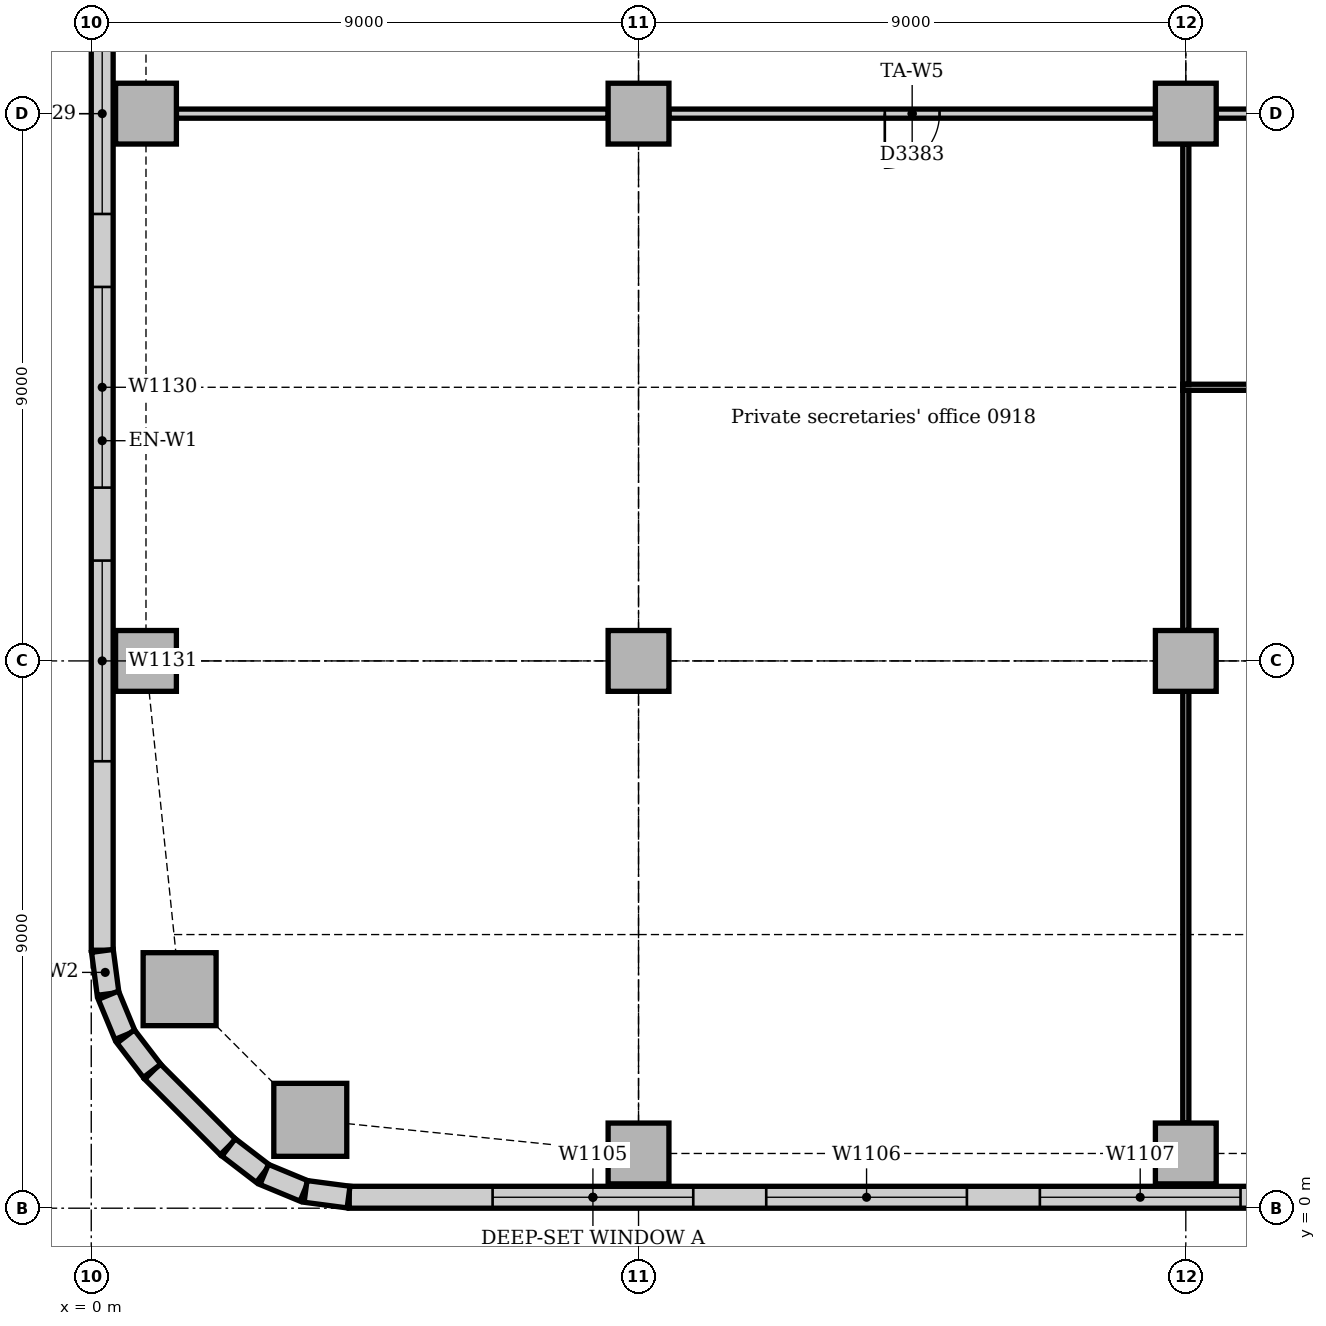
"""IFC4 building model, lengths in metres.
Left out: names, types, materials, properties, quantities, classifications, styles, units other than length and angle.
Written with IfcOpenShell. Run it as: python <this file> out.ifc"""

import sys

from ifc_helpers import new_model, si_unit, direction, frame, frame_2d, origin, origin_2d, place, context, subcontext, project, spatial, rectangle, extrude, element, fill, save


model = new_model("IFC4")
c1 = context("Model", 3, precision=1e-05, world=origin(), true_north=direction((0.0, 1.0)))
c2 = subcontext(c1, "Body", "Model", "MODEL_VIEW")
j1 = project(units=[si_unit("LENGTHUNIT", "METRE"), si_unit("PLANEANGLEUNIT", "RADIAN")], contexts=[c1])
p1 = place(None, origin())
s1 = spatial("IfcSite", under=j1, at=p1, CompositionType="ELEMENT")
p2 = place(p1, origin())
s2 = spatial("IfcBuilding", under=s1, at=p2, CompositionType="ELEMENT")
p3 = place(p2, frame((0.0, 0.0, 42.0)))
s3 = spatial("IfcBuildingStorey", under=s2, at=p3, CompositionType="ELEMENT", Elevation=42.0)
for number, where, z_axis, x_axis in (
    (1, (3.602, 1.453, 0.0), (0.0, 0.0, 1.0), (1.0, 0.0, 0.0)),
    (2, (1.453, 3.602, 0.0), (0.0, 0.0, 1.0), (1.0, 0.0, 0.0)),
):
    element("IfcColumn", number, at=place(p3, frame(where, z_axis=z_axis, x_axis=x_axis)), inside=s3, PredefinedType="COLUMN", context=c2, shape_type="SweptSolid", body=[
        extrude(rectangle(XDim=1.2, YDim=1.2, at=origin_2d()), origin(), (0.0, 0.0, 1.0), 3.7),
    ])
for number, where, z_axis, x_axis in (
    (3, (9.0, 0.9, 0.0), (0.0, 0.0, 1.0), (1.0, 0.0, 0.0)),
    (4, (18.0, 0.9, 0.0), (0.0, 0.0, 1.0), (1.0, 0.0, 0.0)),
    (5, (0.9, 9.0, 0.0), (0.0, 0.0, 1.0), (1.0, 0.0, 0.0)),
    (6, (0.9, 18.0, 0.0), (0.0, 0.0, 1.0), (1.0, 0.0, 0.0)),
    (7, (9.0, 9.0, 0.0), (0.0, 0.0, 1.0), (1.0, 0.0, 0.0)),
    (8, (9.0, 18.0, 0.0), (0.0, 0.0, 1.0), (1.0, 0.0, 0.0)),
    (9, (18.0, 9.0, 0.0), (0.0, 0.0, 1.0), (1.0, 0.0, 0.0)),
    (10, (18.0, 18.0, 0.0), (0.0, 0.0, 1.0), (1.0, 0.0, 0.0)),
):
    element("IfcColumn", number, at=place(p3, frame(where, z_axis=z_axis, x_axis=x_axis)), inside=s3, PredefinedType="COLUMN", context=c2, shape_type="SweptSolid", body=[
        extrude(rectangle(XDim=1.0, YDim=1.0, at=origin_2d()), origin(), (0.0, 0.0, 1.0), 3.7),
    ])
p4 = place(p3, frame((4.243, 0.18, 0.0), z_axis=(0.0, 0.0, 1.0), x_axis=(1.0, 0.0, 0.0)))
e11 = element("IfcWall", 11, at=p4, inside=s3, PredefinedType="STANDARD", context=c2, shape_type="SweptSolid", body=[
    extrude(rectangle(XDim=44.015, YDim=0.36, at=frame_2d((22.007, 0.0))), origin(), (0.0, 0.0, 1.0), 3.7),
])
p5 = place(p4, frame((2.357, 0.0, 0.9)))
e12 = element("IfcOpeningElement", 12, at=p5, cuts=e11, PredefinedType="OPENING", context=c2, shape_type="SweptSolid", body=[
    extrude(rectangle(XDim=3.3, YDim=1.6, at=frame_2d((1.65, 0.8))), frame((0.0, 0.19, 0.0), z_axis=(0.0, -1.0, 0.0), x_axis=(1.0, 0.0, 0.0)), (0.0, 0.0, 1.0), 0.38),
])
p6 = place(p4, frame((6.857, 0.0, 0.9)))
e13 = element("IfcOpeningElement", 13, at=p6, cuts=e11, PredefinedType="OPENING", context=c2, shape_type="SweptSolid", body=[
    extrude(rectangle(XDim=3.3, YDim=1.6, at=frame_2d((1.65, 0.8))), frame((0.0, 0.19, 0.0), z_axis=(0.0, -1.0, 0.0), x_axis=(1.0, 0.0, 0.0)), (0.0, 0.0, 1.0), 0.38),
])
p7 = place(p4, frame((11.357, 0.0, 0.9)))
e14 = element("IfcOpeningElement", 14, at=p7, cuts=e11, PredefinedType="OPENING", context=c2, shape_type="SweptSolid", body=[
    extrude(rectangle(XDim=3.3, YDim=1.6, at=frame_2d((1.65, 0.8))), frame((0.0, 0.19, 0.0), z_axis=(0.0, -1.0, 0.0), x_axis=(1.0, 0.0, 0.0)), (0.0, 0.0, 1.0), 0.38),
])
p8 = place(p4, frame((15.857, 0.0, 0.9)))
e15 = element("IfcOpeningElement", 15, at=p8, cuts=e11, PredefinedType="OPENING", context=c2, shape_type="SweptSolid", body=[
    extrude(rectangle(XDim=3.3, YDim=1.6, at=frame_2d((1.65, 0.8))), frame((0.0, 0.19, 0.0), z_axis=(0.0, -1.0, 0.0), x_axis=(1.0, 0.0, 0.0)), (0.0, 0.0, 1.0), 0.38),
])
p9 = place(p4, frame((20.357, 0.0, 0.9)))
e16 = element("IfcOpeningElement", 16, at=p9, cuts=e11, PredefinedType="OPENING", context=c2, shape_type="SweptSolid", body=[
    extrude(rectangle(XDim=3.3, YDim=1.6, at=frame_2d((1.65, 0.8))), frame((0.0, 0.19, 0.0), z_axis=(0.0, -1.0, 0.0), x_axis=(1.0, 0.0, 0.0)), (0.0, 0.0, 1.0), 0.38),
])
p10 = place(p4, frame((24.857, 0.0, 0.9)))
e17 = element("IfcOpeningElement", 17, at=p10, cuts=e11, PredefinedType="OPENING", context=c2, shape_type="SweptSolid", body=[
    extrude(rectangle(XDim=3.3, YDim=1.6, at=frame_2d((1.65, 0.8))), frame((0.0, 0.19, 0.0), z_axis=(0.0, -1.0, 0.0), x_axis=(1.0, 0.0, 0.0)), (0.0, 0.0, 1.0), 0.38),
])
p11 = place(p4, frame((29.357, 0.0, 0.9)))
e18 = element("IfcOpeningElement", 18, at=p11, cuts=e11, PredefinedType="OPENING", context=c2, shape_type="SweptSolid", body=[
    extrude(rectangle(XDim=3.3, YDim=1.6, at=frame_2d((1.65, 0.8))), frame((0.0, 0.19, 0.0), z_axis=(0.0, -1.0, 0.0), x_axis=(1.0, 0.0, 0.0)), (0.0, 0.0, 1.0), 0.38),
])
p12 = place(p4, frame((33.857, 0.0, 0.9)))
e19 = element("IfcOpeningElement", 19, at=p12, cuts=e11, PredefinedType="OPENING", context=c2, shape_type="SweptSolid", body=[
    extrude(rectangle(XDim=3.3, YDim=1.6, at=frame_2d((1.65, 0.8))), frame((0.0, 0.19, 0.0), z_axis=(0.0, -1.0, 0.0), x_axis=(1.0, 0.0, 0.0)), (0.0, 0.0, 1.0), 0.38),
])
p13 = place(p4, frame((38.657, 0.0, 0.9)))
e20 = element("IfcOpeningElement", 20, at=p13, cuts=e11, PredefinedType="OPENING", context=c2, shape_type="SweptSolid", body=[
    extrude(rectangle(XDim=3.3, YDim=1.6, at=frame_2d((1.65, 0.8))), frame((0.0, 0.19, 0.0), z_axis=(0.0, -1.0, 0.0), x_axis=(1.0, 0.0, 0.0)), (0.0, 0.0, 1.0), 0.38),
])
p14 = place(p3, frame((0.18, 21.0, 0.0), z_axis=(0.0, 0.0, 1.0), x_axis=(0.0, -1.0, 0.0)))
e21 = element("IfcWall", 21, at=p14, inside=s3, PredefinedType="STANDARD", context=c2, shape_type="SweptSolid", body=[
    extrude(rectangle(XDim=16.757, YDim=0.36, at=frame_2d((8.379, 0.0))), origin(), (0.0, 0.0, 1.0), 3.7),
])
p15 = place(p14, frame((1.35, 0.0, 0.9)))
e22 = element("IfcOpeningElement", 22, at=p15, cuts=e21, PredefinedType="OPENING", context=c2, shape_type="SweptSolid", body=[
    extrude(rectangle(XDim=3.3, YDim=1.6, at=frame_2d((1.65, 0.8))), frame((0.0, 0.19, 0.0), z_axis=(0.0, -1.0, 0.0), x_axis=(1.0, 0.0, 0.0)), (0.0, 0.0, 1.0), 0.38),
])
p16 = place(p14, frame((5.85, 0.0, 0.9)))
e23 = element("IfcOpeningElement", 23, at=p16, cuts=e21, PredefinedType="OPENING", context=c2, shape_type="SweptSolid", body=[
    extrude(rectangle(XDim=3.3, YDim=1.6, at=frame_2d((1.65, 0.8))), frame((0.0, 0.19, 0.0), z_axis=(0.0, -1.0, 0.0), x_axis=(1.0, 0.0, 0.0)), (0.0, 0.0, 1.0), 0.38),
])
p17 = place(p14, frame((10.35, 0.0, 0.9)))
e24 = element("IfcOpeningElement", 24, at=p17, cuts=e21, PredefinedType="OPENING", context=c2, shape_type="SweptSolid", body=[
    extrude(rectangle(XDim=3.3, YDim=1.6, at=frame_2d((1.65, 0.8))), frame((0.0, 0.19, 0.0), z_axis=(0.0, -1.0, 0.0), x_axis=(1.0, 0.0, 0.0)), (0.0, 0.0, 1.0), 0.38),
])
p18 = place(p3, frame((1.006, 2.249, 0.0), z_axis=(0.0, 0.0, 1.0), x_axis=(0.707106781187, -0.707106781187, 0.0)))
e25 = element("IfcWall", 25, at=p18, inside=s3, PredefinedType="STANDARD", context=c2, shape_type="SweptSolid", body=[
    extrude(rectangle(XDim=1.757, YDim=0.36, at=frame_2d((0.879, 0.0))), origin(), (0.0, 0.0, 1.0), 3.7),
])
for number, where, z_axis, x_axis in (
    (26, (0.183, 4.231, 0.0), (0.0, 0.0, 1.0), (0.131, -0.991, 0.0)),
    (27, (0.282, 3.503, 0.0), (0.0, 0.0, 1.0), (0.383, -0.924, 0.0)),
):
    element("IfcWall", number, at=place(p3, frame(where, z_axis=z_axis, x_axis=x_axis)), inside=s3, PredefinedType="STANDARD", context=c2, shape_type="SweptSolid", body=[
        extrude(rectangle(XDim=0.713, YDim=0.36, at=frame_2d((0.356, 0.0))), origin(), (0.0, 0.0, 1.0), 3.7),
    ])
for number, where, z_axis, x_axis in (
    (28, (0.566, 2.825, 0.0), (0.0, 0.0, 1.0), (0.609, -0.793, 0.0)),
    (29, (2.259, 1.0, 0.0), (0.0, 0.0, 1.0), (0.793, -0.609, 0.0)),
):
    element("IfcWall", number, at=place(p3, frame(where, z_axis=z_axis, x_axis=x_axis)), inside=s3, PredefinedType="STANDARD", context=c2, shape_type="SweptSolid", body=[
        extrude(rectangle(XDim=0.713, YDim=0.36, at=frame_2d((0.357, 0.0))), origin(), (0.0, 0.0, 1.0), 3.7),
    ])
for number, where, z_axis, x_axis in (
    (30, (2.844, 0.555, 0.0), (0.0, 0.0, 1.0), (0.924, -0.383, 0.0)),
    (31, (3.524, 0.276, 0.0), (0.0, 0.0, 1.0), (0.991, -0.131, 0.0)),
):
    element("IfcWall", number, at=place(p3, frame(where, z_axis=z_axis, x_axis=x_axis)), inside=s3, PredefinedType="STANDARD", context=c2, shape_type="SweptSolid", body=[
        extrude(rectangle(XDim=0.713, YDim=0.36, at=frame_2d((0.356, 0.0))), origin(), (0.0, 0.0, 1.0), 3.7),
    ])
p19 = place(p3, frame((18.5, 18.0, 0.0), z_axis=(0.0, 0.0, 1.0), x_axis=(1.0, 0.0, 0.0)))
e32 = element("IfcWall", 32, at=p19, inside=s3, PredefinedType="PARTITIONING", context=c2, shape_type="SweptSolid", body=[
    extrude(rectangle(XDim=8.0, YDim=0.15, at=frame_2d((4.0, 0.0))), origin(), (0.0, 0.0, 1.0), 3.0),
])
p20 = place(p3, frame((9.5, 18.0, 0.0), z_axis=(0.0, 0.0, 1.0), x_axis=(1.0, 0.0, 0.0)))
e33 = element("IfcWall", 33, at=p20, inside=s3, PredefinedType="PARTITIONING", context=c2, shape_type="SweptSolid", body=[
    extrude(rectangle(XDim=8.0, YDim=0.15, at=frame_2d((4.0, 0.0))), origin(), (0.0, 0.0, 1.0), 3.0),
])
p21 = place(p20, frame((3.55, 0.0, 0.0)))
e34 = element("IfcOpeningElement", 34, at=p21, cuts=e33, PredefinedType="OPENING", context=c2, shape_type="SweptSolid", body=[
    extrude(rectangle(XDim=0.9, YDim=2.1, at=frame_2d((0.45, 1.05))), frame((0.0, 0.085, 0.0), z_axis=(0.0, -1.0, 0.0), x_axis=(1.0, 0.0, 0.0)), (0.0, 0.0, 1.0), 0.17),
])
p22 = place(p3, frame((1.4, 18.0, 0.0), z_axis=(0.0, 0.0, 1.0), x_axis=(1.0, 0.0, 0.0)))
e35 = element("IfcWall", 35, at=p22, inside=s3, PredefinedType="PARTITIONING", context=c2, shape_type="SweptSolid", body=[
    extrude(rectangle(XDim=7.1, YDim=0.15, at=frame_2d((3.55, 0.0))), origin(), (0.0, 0.0, 1.0), 3.0),
])
p23 = place(p3, frame((17.95, 13.5, 0.0), z_axis=(0.0, 0.0, 1.0), x_axis=(1.0, 0.0, 0.0)))
e36 = element("IfcWall", 36, at=p23, inside=s3, PredefinedType="PARTITIONING", context=c2, shape_type="SweptSolid", body=[
    extrude(rectangle(XDim=17.975, YDim=0.1, at=frame_2d((8.988, 0.0))), origin(), (0.0, 0.0, 1.0), 3.2),
])
p24 = place(p23, frame((4.15, 0.0, 0.0)))
e37 = element("IfcOpeningElement", 37, at=p24, cuts=e36, PredefinedType="OPENING", context=c2, shape_type="SweptSolid", body=[
    extrude(rectangle(XDim=0.9, YDim=2.1, at=frame_2d((0.45, 1.05))), frame((0.0, 0.06, 0.0), z_axis=(0.0, -1.0, 0.0), x_axis=(1.0, 0.0, 0.0)), (0.0, 0.0, 1.0), 0.12),
])
p25 = place(p23, frame((13.0, 0.0, 0.0)))
e38 = element("IfcOpeningElement", 38, at=p25, cuts=e36, PredefinedType="OPENING", context=c2, shape_type="SweptSolid", body=[
    extrude(rectangle(XDim=0.9, YDim=2.1, at=frame_2d((0.45, 1.05))), frame((0.0, 0.06, 0.0), z_axis=(0.0, -1.0, 0.0), x_axis=(1.0, 0.0, 0.0)), (0.0, 0.0, 1.0), 0.12),
])
p26 = place(p3, frame((18.0, 1.4, 0.0), z_axis=(0.0, 0.0, 1.0), x_axis=(0.0, 1.0, 0.0)))
e39 = element("IfcWall", 39, at=p26, inside=s3, PredefinedType="PARTITIONING", context=c2, shape_type="SweptSolid", body=[
    extrude(rectangle(XDim=7.1, YDim=0.1, at=frame_2d((3.55, 0.0))), origin(), (0.0, 0.0, 1.0), 3.008),
])
for number, where, z_axis, x_axis in (
    (40, (18.0, 13.55, 0.0), (0.0, 0.0, 1.0), (0.0, 1.0, 0.0)),
    (41, (18.0, 9.5, 0.0), (0.0, 0.0, 1.0), (0.0, 1.0, 0.0)),
):
    element("IfcWall", number, at=place(p3, frame(where, z_axis=z_axis, x_axis=x_axis)), inside=s3, PredefinedType="PARTITIONING", context=c2, shape_type="SweptSolid", body=[
        extrude(rectangle(XDim=3.95, YDim=0.1, at=frame_2d((1.975, 0.0))), origin(), (0.0, 0.0, 1.0), 3.008),
    ])
p27 = place(p5, origin())
e42 = element("IfcWindow", 42, at=p27, inside=s3, PartitioningType="SINGLE_PANEL", PredefinedType="WINDOW", context=c2, shape_type="SweptSolid", body=[
    extrude(rectangle(XDim=3.3, YDim=1.6, at=frame_2d((1.65, 0.8))), frame((0.0, 0.13, 0.0), z_axis=(0.0, -1.0, 0.0), x_axis=(1.0, 0.0, 0.0)), (0.0, 0.0, 1.0), 0.06),
])
fill(e12, e42)
p28 = place(p6, origin())
e43 = element("IfcWindow", 43, at=p28, inside=s3, PartitioningType="SINGLE_PANEL", PredefinedType="WINDOW", context=c2, shape_type="SweptSolid", body=[
    extrude(rectangle(XDim=3.3, YDim=1.6, at=frame_2d((1.65, 0.8))), frame((0.0, 0.13, 0.0), z_axis=(0.0, -1.0, 0.0), x_axis=(1.0, 0.0, 0.0)), (0.0, 0.0, 1.0), 0.06),
])
fill(e13, e43)
p29 = place(p7, origin())
e44 = element("IfcWindow", 44, at=p29, inside=s3, PartitioningType="SINGLE_PANEL", PredefinedType="WINDOW", context=c2, shape_type="SweptSolid", body=[
    extrude(rectangle(XDim=3.3, YDim=1.6, at=frame_2d((1.65, 0.8))), frame((0.0, 0.13, 0.0), z_axis=(0.0, -1.0, 0.0), x_axis=(1.0, 0.0, 0.0)), (0.0, 0.0, 1.0), 0.06),
])
fill(e14, e44)
p30 = place(p15, origin())
e45 = element("IfcWindow", 45, at=p30, inside=s3, PartitioningType="SINGLE_PANEL", PredefinedType="WINDOW", context=c2, shape_type="SweptSolid", body=[
    extrude(rectangle(XDim=3.3, YDim=1.6, at=frame_2d((1.65, 0.8))), frame((0.0, 0.13, 0.0), z_axis=(0.0, -1.0, 0.0), x_axis=(1.0, 0.0, 0.0)), (0.0, 0.0, 1.0), 0.06),
])
fill(e22, e45)
p31 = place(p16, origin())
e46 = element("IfcWindow", 46, at=p31, inside=s3, PartitioningType="SINGLE_PANEL", PredefinedType="WINDOW", context=c2, shape_type="SweptSolid", body=[
    extrude(rectangle(XDim=3.3, YDim=1.6, at=frame_2d((1.65, 0.8))), frame((0.0, 0.13, 0.0), z_axis=(0.0, -1.0, 0.0), x_axis=(1.0, 0.0, 0.0)), (0.0, 0.0, 1.0), 0.06),
])
fill(e23, e46)
p32 = place(p17, origin())
e47 = element("IfcWindow", 47, at=p32, inside=s3, PartitioningType="SINGLE_PANEL", PredefinedType="WINDOW", context=c2, shape_type="SweptSolid", body=[
    extrude(rectangle(XDim=3.3, YDim=1.6, at=frame_2d((1.65, 0.8))), frame((0.0, 0.13, 0.0), z_axis=(0.0, -1.0, 0.0), x_axis=(1.0, 0.0, 0.0)), (0.0, 0.0, 1.0), 0.06),
])
fill(e24, e47)
p33 = place(p21, frame((0.9, 0.0, 0.0), z_axis=(0.0, 0.0, 1.0), x_axis=(-1.0, 0.0, 0.0)))
e48 = element("IfcDoor", 48, at=p33, inside=s3, OperationType="SINGLE_SWING_RIGHT", PredefinedType="DOOR", context=c2, shape_type="SweptSolid", body=[
    extrude(rectangle(XDim=0.9, YDim=2.1, at=frame_2d((0.45, 1.05))), frame((0.0, 0.025, 0.0), z_axis=(0.0, -1.0, 0.0), x_axis=(1.0, 0.0, 0.0)), (0.0, 0.0, 1.0), 0.05),
])
fill(e34, e48)
save(model, sys.argv[1])
